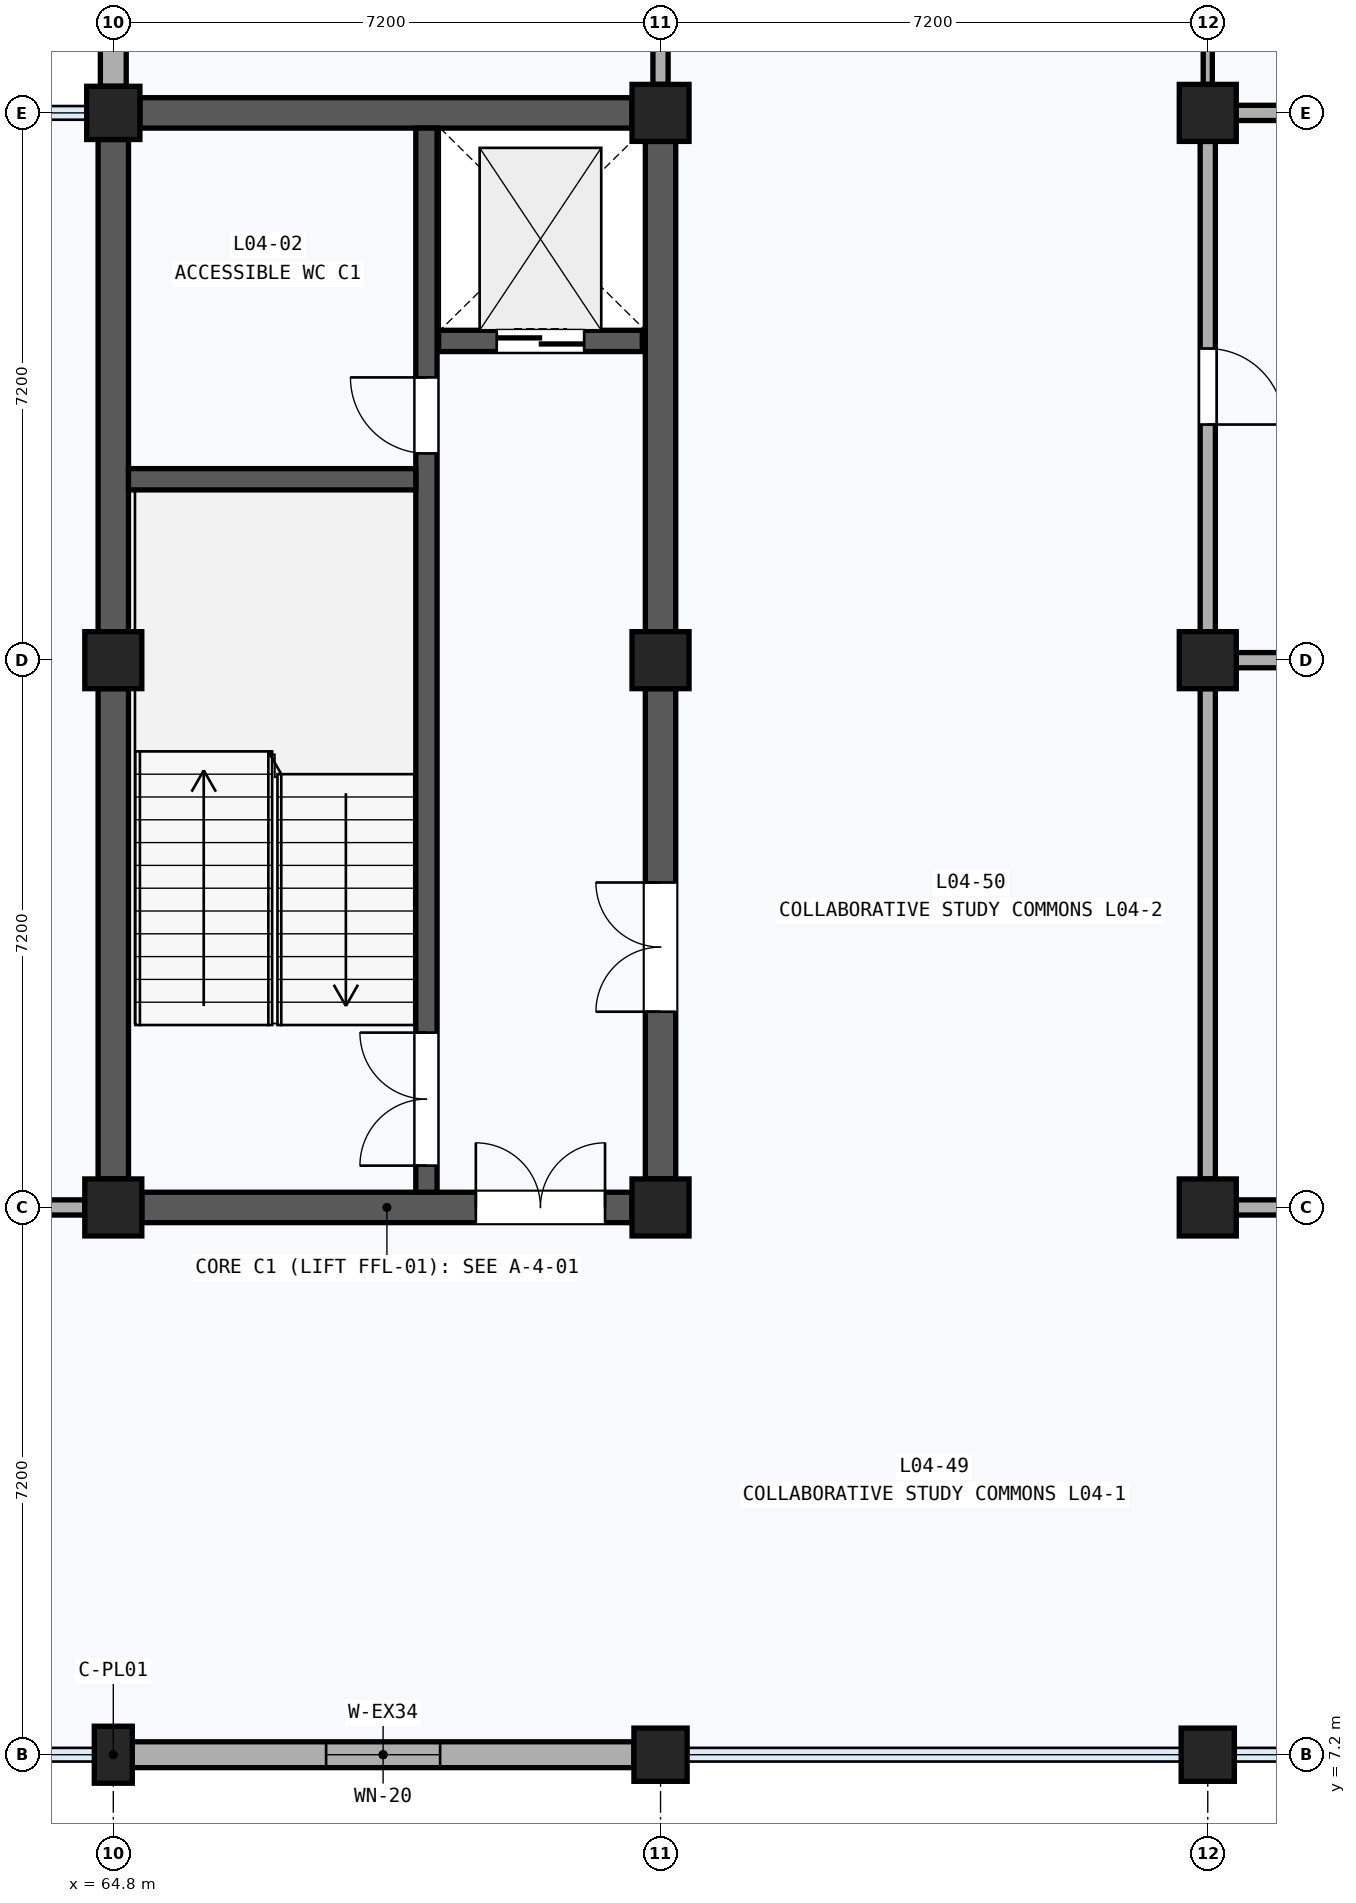
"""IFC4 building model, lengths in metres.
Left out: names, types, materials, properties, quantities, classifications, styles, units other than length and angle.
Written with IfcOpenShell. Run it as: python <this file> out.ifc"""

import sys

from ifc_helpers import new_model, si_unit, direction, frame, frame_2d, origin, origin_2d, place, context, subcontext, project, spatial, rectangle, extrude, element, fill, save


model = new_model("IFC4")
c1 = context("Model", 3, precision=1e-05, world=origin(), true_north=direction((0.0, 1.0)))
c2 = subcontext(c1, "Body", "Model", "MODEL_VIEW")
j1 = project(units=[si_unit("LENGTHUNIT", "METRE"), si_unit("PLANEANGLEUNIT", "RADIAN")], contexts=[c1])
p1 = place(None, origin())
s1 = spatial("IfcSite", under=j1, at=p1, CompositionType="ELEMENT")
p2 = place(p1, origin())
s2 = spatial("IfcBuilding", under=s1, at=p2, CompositionType="ELEMENT")
p3 = place(p2, frame((0.0, 0.0, 18.6)))
s3 = spatial("IfcBuildingStorey", under=s2, at=p3, CompositionType="ELEMENT", Elevation=18.6)
p4 = place(p3, frame((64.8, 7.2, 0.0), z_axis=(0.0, 0.0, 1.0), x_axis=(1.0, 0.0, 0.0)))
e1 = element("IfcColumn", 1, at=p4, inside=s3, PredefinedType="PILASTER", context=c2, shape_type="SweptSolid", body=[
    extrude(rectangle(XDim=0.5, YDim=0.75, at=origin_2d()), origin(), (0.0, 0.0, 1.0), 4.0),
])
for number, where, z_axis, x_axis in (
    (2, (64.8, 14.4, 0.0), (0.0, 0.0, 1.0), (1.0, 0.0, 0.0)),
    (3, (64.8, 21.6, 0.0), (0.0, 0.0, 1.0), (1.0, 0.0, 0.0)),
):
    element("IfcColumn", number, at=place(p3, frame(where, z_axis=z_axis, x_axis=x_axis)), inside=s3, PredefinedType="COLUMN", context=c2, shape_type="SweptSolid", body=[
        extrude(rectangle(XDim=0.75, YDim=0.75, at=origin_2d()), origin(), (0.0, 0.0, 1.0), 4.0),
    ])
for number, where, z_axis, x_axis in (
    (4, (64.8, 28.8, 0.0), (0.0, 0.0, 1.0), (1.0, 0.0, 0.0)),
    (5, (72.0, 7.2, 0.0), (0.0, 0.0, 1.0), (1.0, 0.0, 0.0)),
):
    element("IfcColumn", number, at=place(p3, frame(where, z_axis=z_axis, x_axis=x_axis)), inside=s3, PredefinedType="COLUMN", context=c2, shape_type="SweptSolid", body=[
        extrude(rectangle(XDim=0.7, YDim=0.7, at=origin_2d()), origin(), (0.0, 0.0, 1.0), 4.0),
    ])
for number, where, z_axis, x_axis in (
    (6, (72.0, 14.4, 0.0), (0.0, 0.0, 1.0), (1.0, 0.0, 0.0)),
    (7, (72.0, 21.6, 0.0), (0.0, 0.0, 1.0), (1.0, 0.0, 0.0)),
    (8, (72.0, 28.8, 0.0), (0.0, 0.0, 1.0), (1.0, 0.0, 0.0)),
):
    element("IfcColumn", number, at=place(p3, frame(where, z_axis=z_axis, x_axis=x_axis)), inside=s3, PredefinedType="COLUMN", context=c2, shape_type="SweptSolid", body=[
        extrude(rectangle(XDim=0.75, YDim=0.75, at=origin_2d()), origin(), (0.0, 0.0, 1.0), 4.0),
    ])
p5 = place(p3, frame((79.2, 7.2, 0.0), z_axis=(0.0, 0.0, 1.0), x_axis=(1.0, 0.0, 0.0)))
e9 = element("IfcColumn", 9, at=p5, inside=s3, PredefinedType="COLUMN", context=c2, shape_type="SweptSolid", body=[
    extrude(rectangle(XDim=0.7, YDim=0.7, at=origin_2d()), origin(), (0.0, 0.0, 1.0), 4.0),
])
for number, where, z_axis, x_axis in (
    (10, (79.2, 14.4, 0.0), (0.0, 0.0, 1.0), (1.0, 0.0, 0.0)),
    (11, (79.2, 21.6, 0.0), (0.0, 0.0, 1.0), (1.0, 0.0, 0.0)),
    (12, (79.2, 28.8, 0.0), (0.0, 0.0, 1.0), (1.0, 0.0, 0.0)),
):
    element("IfcColumn", number, at=place(p3, frame(where, z_axis=z_axis, x_axis=x_axis)), inside=s3, PredefinedType="COLUMN", context=c2, shape_type="SweptSolid", body=[
        extrude(rectangle(XDim=0.75, YDim=0.75, at=origin_2d()), origin(), (0.0, 0.0, 1.0), 4.0),
    ])
p6 = place(p3, frame((65.05, 7.2, 0.0), z_axis=(0.0, 0.0, 1.0), x_axis=(1.0, 0.0, 0.0)))
e13 = element("IfcWall", 13, at=p6, inside=s3, PredefinedType="SOLIDWALL", context=c2, shape_type="SweptSolid", body=[
    extrude(rectangle(XDim=6.6, YDim=0.34, at=frame_2d((3.3, 0.0))), origin(), (0.0, 0.0, 1.0), 3.11),
])
p7 = place(p6, frame((2.55, 0.0, 1.1)))
e14 = element("IfcOpeningElement", 14, at=p7, cuts=e13, PredefinedType="OPENING", context=c2, shape_type="SweptSolid", body=[
    extrude(rectangle(XDim=1.5, YDim=1.35, at=frame_2d((0.75, 0.675))), frame((0.0, 0.182, 0.0), z_axis=(0.0, -1.0, 0.0), x_axis=(1.0, 0.0, 0.0)), (0.0, 0.0, 1.0), 0.364),
])
p8 = place(p3, frame((64.8, 29.15, 0.0), z_axis=(0.0, 0.0, 1.0), x_axis=(0.0, 1.0, 0.0)))
e15 = element("IfcWall", 15, at=p8, inside=s3, PredefinedType="SOLIDWALL", context=c2, shape_type="SweptSolid", body=[
    extrude(rectangle(XDim=6.5, YDim=0.34, at=frame_2d((3.25, 0.0))), origin(), (0.0, 0.0, 1.0), 3.11),
])
p9 = place(p8, frame((2.15, 0.0, 0.9)))
e16 = element("IfcOpeningElement", 16, at=p9, cuts=e15, PredefinedType="OPENING", context=c2, shape_type="SweptSolid", body=[
    extrude(rectangle(XDim=2.2, YDim=1.8, at=frame_2d((1.1, 0.9))), frame((0.0, 0.182, 0.0), z_axis=(0.0, -1.0, 0.0), x_axis=(1.0, 0.0, 0.0)), (0.0, 0.0, 1.0), 0.364),
])
p10 = place(p3, frame((64.8, 14.775, 0.0), z_axis=(0.0, 0.0, 1.0), x_axis=(0.0, 1.0, 0.0)))
e17 = element("IfcWall", 17, at=p10, inside=s3, PredefinedType="SHEAR", context=c2, shape_type="SweptSolid", body=[
    extrude(rectangle(XDim=6.45, YDim=0.4, at=frame_2d((3.225, 0.0))), origin(), (0.0, 0.0, 1.0), 2.97),
])
p11 = place(p3, frame((64.8, 21.975, 0.0), z_axis=(0.0, 0.0, 1.0), x_axis=(0.0, 1.0, 0.0)))
e18 = element("IfcWall", 18, at=p11, inside=s3, PredefinedType="SHEAR", context=c2, shape_type="SweptSolid", body=[
    extrude(rectangle(XDim=6.475, YDim=0.4, at=frame_2d((3.237, 0.0))), origin(), (0.0, 0.0, 1.0), 2.97),
])
p12 = place(p3, frame((72.0, 14.775, 0.0), z_axis=(0.0, 0.0, 1.0), x_axis=(0.0, 1.0, 0.0)))
e19 = element("IfcWall", 19, at=p12, inside=s3, PredefinedType="SHEAR", context=c2, shape_type="SweptSolid", body=[
    extrude(rectangle(XDim=6.45, YDim=0.4, at=frame_2d((3.225, 0.0))), origin(), (0.0, 0.0, 1.0), 2.97),
])
p13 = place(p12, frame((2.2, 0.0, 0.0)))
e20 = element("IfcOpeningElement", 20, at=p13, cuts=e19, PredefinedType="OPENING", context=c2, shape_type="SweptSolid", body=[
    extrude(rectangle(XDim=1.7, YDim=2.25, at=frame_2d((0.85, 1.125))), frame((0.0, 0.212, 0.0), z_axis=(0.0, -1.0, 0.0), x_axis=(1.0, 0.0, 0.0)), (0.0, 0.0, 1.0), 0.424),
])
p14 = place(p3, frame((72.0, 21.975, 0.0), z_axis=(0.0, 0.0, 1.0), x_axis=(0.0, 1.0, 0.0)))
e21 = element("IfcWall", 21, at=p14, inside=s3, PredefinedType="SHEAR", context=c2, shape_type="SweptSolid", body=[
    extrude(rectangle(XDim=6.45, YDim=0.4, at=frame_2d((3.225, 0.0))), origin(), (0.0, 0.0, 1.0), 2.97),
])
p15 = place(p3, frame((65.175, 14.4, 0.0), z_axis=(0.0, 0.0, 1.0), x_axis=(1.0, 0.0, 0.0)))
e22 = element("IfcWall", 22, at=p15, inside=s3, PredefinedType="SHEAR", context=c2, shape_type="SweptSolid", body=[
    extrude(rectangle(XDim=6.45, YDim=0.4, at=frame_2d((3.225, 0.0))), origin(), (0.0, 0.0, 1.0), 2.97),
])
p16 = place(p15, frame((4.395, 0.0, 0.0)))
e23 = element("IfcOpeningElement", 23, at=p16, cuts=e22, PredefinedType="OPENING", context=c2, shape_type="SweptSolid", body=[
    extrude(rectangle(XDim=1.7, YDim=2.25, at=frame_2d((0.85, 1.125))), frame((0.0, 0.212, 0.0), z_axis=(0.0, -1.0, 0.0), x_axis=(1.0, 0.0, 0.0)), (0.0, 0.0, 1.0), 0.424),
])
p17 = place(p3, frame((65.15, 28.8, 0.0), z_axis=(0.0, 0.0, 1.0), x_axis=(1.0, 0.0, 0.0)))
e24 = element("IfcWall", 24, at=p17, inside=s3, PredefinedType="SHEAR", context=c2, shape_type="SweptSolid", body=[
    extrude(rectangle(XDim=6.475, YDim=0.4, at=frame_2d((3.238, 0.0))), origin(), (0.0, 0.0, 1.0), 2.97),
])
p18 = place(p3, frame((68.92, 14.6, 0.0), z_axis=(0.0, 0.0, 1.0), x_axis=(0.0, 1.0, 0.0)))
e25 = element("IfcWall", 25, at=p18, inside=s3, PredefinedType="SHEAR", context=c2, shape_type="SweptSolid", body=[
    extrude(rectangle(XDim=14.0, YDim=0.28, at=frame_2d((7.0, 0.0))), origin(), (0.0, 0.0, 1.0), 3.74),
])
p19 = place(p18, frame((0.35, 0.0, 0.0)))
e26 = element("IfcOpeningElement", 26, at=p19, cuts=e25, PredefinedType="OPENING", context=c2, shape_type="SweptSolid", body=[
    extrude(rectangle(XDim=1.75, YDim=2.15, at=frame_2d((0.875, 1.075))), frame((0.0, 0.152, 0.0), z_axis=(0.0, -1.0, 0.0), x_axis=(1.0, 0.0, 0.0)), (0.0, 0.0, 1.0), 0.304),
])
p20 = place(p18, frame((9.72, 0.0, 0.0)))
e27 = element("IfcOpeningElement", 27, at=p20, cuts=e25, PredefinedType="OPENING", context=c2, shape_type="SweptSolid", body=[
    extrude(rectangle(XDim=1.0, YDim=2.15, at=frame_2d((0.5, 1.075))), frame((0.0, 0.152, 0.0), z_axis=(0.0, -1.0, 0.0), x_axis=(1.0, 0.0, 0.0)), (0.0, 0.0, 1.0), 0.304),
])
p21 = place(p3, frame((65.0, 23.98, 0.0), z_axis=(0.0, 0.0, 1.0), x_axis=(1.0, 0.0, 0.0)))
e28 = element("IfcWall", 28, at=p21, inside=s3, PredefinedType="SHEAR", context=c2, shape_type="SweptSolid", body=[
    extrude(rectangle(XDim=3.78, YDim=0.28, at=frame_2d((1.89, 0.0))), origin(), (0.0, 0.0, 1.0), 3.74),
])
p22 = place(p3, frame((69.08, 25.8, 0.0), z_axis=(0.0, 0.0, 1.0), x_axis=(1.0, 0.0, 0.0)))
e29 = element("IfcWall", 29, at=p22, inside=s3, PredefinedType="SHEAR", context=c2, shape_type="SweptSolid", body=[
    extrude(rectangle(XDim=2.68, YDim=0.28, at=frame_2d((1.34, 0.0))), origin(), (0.0, 0.0, 1.0), 3.74),
])
p23 = place(p22, frame((0.765, 0.0, 0.0)))
e30 = element("IfcOpeningElement", 30, at=p23, cuts=e29, PredefinedType="OPENING", context=c2, shape_type="SweptSolid", body=[
    extrude(rectangle(XDim=1.15, YDim=2.2, at=frame_2d((0.575, 1.1))), frame((0.0, 0.152, 0.0), z_axis=(0.0, -1.0, 0.0), x_axis=(1.0, 0.0, 0.0)), (0.0, 0.0, 1.0), 0.304),
])
p24 = place(p3, frame((57.975, 14.4, 0.0), z_axis=(0.0, 0.0, 1.0), x_axis=(1.0, 0.0, 0.0)))
e31 = element("IfcWall", 31, at=p24, inside=s3, PredefinedType="PARTITIONING", context=c2, shape_type="SweptSolid", body=[
    extrude(rectangle(XDim=6.45, YDim=0.2, at=frame_2d((3.225, 0.0))), origin(), (0.0, 0.0, 1.0), 2.97),
])
p25 = place(p24, frame((2.725, 0.0, 0.0)))
e32 = element("IfcOpeningElement", 32, at=p25, cuts=e31, PredefinedType="OPENING", context=c2, shape_type="SweptSolid", body=[
    extrude(rectangle(XDim=1.0, YDim=2.1, at=frame_2d((0.5, 1.05))), frame((0.0, 0.112, 0.0), z_axis=(0.0, -1.0, 0.0), x_axis=(1.0, 0.0, 0.0)), (0.0, 0.0, 1.0), 0.224),
])
p26 = place(p3, frame((72.0, 29.175, 0.0), z_axis=(0.0, 0.0, 1.0), x_axis=(0.0, 1.0, 0.0)))
e33 = element("IfcWall", 33, at=p26, inside=s3, PredefinedType="PARTITIONING", context=c2, shape_type="SweptSolid", body=[
    extrude(rectangle(XDim=6.45, YDim=0.2, at=frame_2d((3.225, 0.0))), origin(), (0.0, 0.0, 1.0), 2.97),
])
p27 = place(p26, frame((2.625, 0.0, 0.0)))
e34 = element("IfcOpeningElement", 34, at=p27, cuts=e33, PredefinedType="OPENING", context=c2, shape_type="SweptSolid", body=[
    extrude(rectangle(XDim=1.2, YDim=2.24, at=frame_2d((0.6, 1.12))), frame((0.0, 0.112, 0.0), z_axis=(0.0, -1.0, 0.0), x_axis=(1.0, 0.0, 0.0)), (0.0, 0.0, 1.0), 0.224),
])
p28 = place(p3, frame((79.575, 14.4, 0.0), z_axis=(0.0, 0.0, 1.0), x_axis=(1.0, 0.0, 0.0)))
e35 = element("IfcWall", 35, at=p28, inside=s3, PredefinedType="PARTITIONING", context=c2, shape_type="SweptSolid", body=[
    extrude(rectangle(XDim=6.45, YDim=0.2, at=frame_2d((3.225, 0.0))), origin(), (0.0, 0.0, 1.0), 2.97),
])
p29 = place(p28, frame((2.585, 0.0, 0.0)))
e36 = element("IfcOpeningElement", 36, at=p29, cuts=e35, PredefinedType="OPENING", context=c2, shape_type="SweptSolid", body=[
    extrude(rectangle(XDim=1.28, YDim=2.28, at=frame_2d((0.64, 1.14))), frame((0.0, 0.112, 0.0), z_axis=(0.0, -1.0, 0.0), x_axis=(1.0, 0.0, 0.0)), (0.0, 0.0, 1.0), 0.224),
])
p30 = place(p3, frame((79.575, 21.6, 0.0), z_axis=(0.0, 0.0, 1.0), x_axis=(1.0, 0.0, 0.0)))
e37 = element("IfcWall", 37, at=p30, inside=s3, PredefinedType="PARTITIONING", context=c2, shape_type="SweptSolid", body=[
    extrude(rectangle(XDim=6.45, YDim=0.2, at=frame_2d((3.225, 0.0))), origin(), (0.0, 0.0, 1.0), 2.97),
])
p31 = place(p3, frame((79.2, 14.775, 0.0), z_axis=(0.0, 0.0, 1.0), x_axis=(0.0, 1.0, 0.0)))
e38 = element("IfcWall", 38, at=p31, inside=s3, PredefinedType="PARTITIONING", context=c2, shape_type="SweptSolid", body=[
    extrude(rectangle(XDim=6.45, YDim=0.2, at=frame_2d((3.225, 0.0))), origin(), (0.0, 0.0, 1.0), 2.97),
])
p32 = place(p3, frame((79.575, 28.8, 0.0), z_axis=(0.0, 0.0, 1.0), x_axis=(1.0, 0.0, 0.0)))
e39 = element("IfcWall", 39, at=p32, inside=s3, PredefinedType="PARTITIONING", context=c2, shape_type="SweptSolid", body=[
    extrude(rectangle(XDim=6.45, YDim=0.2, at=frame_2d((3.225, 0.0))), origin(), (0.0, 0.0, 1.0), 2.97),
])
p33 = place(p3, frame((79.2, 21.975, 0.0), z_axis=(0.0, 0.0, 1.0), x_axis=(0.0, 1.0, 0.0)))
e40 = element("IfcWall", 40, at=p33, inside=s3, PredefinedType="PARTITIONING", context=c2, shape_type="SweptSolid", body=[
    extrude(rectangle(XDim=6.45, YDim=0.2, at=frame_2d((3.225, 0.0))), origin(), (0.0, 0.0, 1.0), 2.97),
])
p34 = place(p33, frame((2.725, 0.0, 0.0)))
e41 = element("IfcOpeningElement", 41, at=p34, cuts=e40, PredefinedType="OPENING", context=c2, shape_type="SweptSolid", body=[
    extrude(rectangle(XDim=1.0, YDim=2.1, at=frame_2d((0.5, 1.05))), frame((0.0, 0.112, 0.0), z_axis=(0.0, -1.0, 0.0), x_axis=(1.0, 0.0, 0.0)), (0.0, 0.0, 1.0), 0.224),
])
p35 = place(p3, frame((79.2, 29.175, 0.0), z_axis=(0.0, 0.0, 1.0), x_axis=(0.0, 1.0, 0.0)))
e42 = element("IfcWall", 42, at=p35, inside=s3, PredefinedType="MOVABLE", context=c2, shape_type="SweptSolid", body=[
    extrude(rectangle(XDim=6.45, YDim=0.12, at=frame_2d((3.225, 0.0))), origin(), (0.0, 0.0, 1.0), 2.97),
])
p36 = place(p35, frame((2.715, 0.0, 0.0)))
e43 = element("IfcOpeningElement", 43, at=p36, cuts=e42, PredefinedType="OPENING", context=c2, shape_type="SweptSolid", body=[
    extrude(rectangle(XDim=1.02, YDim=2.12, at=frame_2d((0.51, 1.06))), frame((0.0, 0.072, 0.0), z_axis=(0.0, -1.0, 0.0), x_axis=(1.0, 0.0, 0.0)), (0.0, 0.0, 1.0), 0.144),
])
p37 = place(p7, origin())
e44 = element("IfcWindow", 44, at=p37, inside=s3, PartitioningType="SINGLE_PANEL", PredefinedType="WINDOW", context=c2, shape_type="SweptSolid", body=[
    extrude(rectangle(XDim=1.5, YDim=1.35, at=frame_2d((0.75, 0.675))), frame((0.0, 0.03, 0.0), z_axis=(0.0, -1.0, 0.0), x_axis=(1.0, 0.0, 0.0)), (0.0, 0.0, 1.0), 0.06),
])
fill(e14, e44)
p38 = place(p13, origin())
e45 = element("IfcDoor", 45, at=p38, inside=s3, OperationType="DOUBLE_DOOR_SINGLE_SWING", PredefinedType="DOOR", context=c2, shape_type="SweptSolid", body=[
    extrude(rectangle(XDim=1.7, YDim=2.25, at=frame_2d((0.85, 1.125))), frame((0.0, 0.025, 0.0), z_axis=(0.0, -1.0, 0.0), x_axis=(1.0, 0.0, 0.0)), (0.0, 0.0, 1.0), 0.05),
])
fill(e20, e45)
p39 = place(p16, origin())
e46 = element("IfcDoor", 46, at=p39, inside=s3, OperationType="DOUBLE_DOOR_SINGLE_SWING", PredefinedType="DOOR", context=c2, shape_type="SweptSolid", body=[
    extrude(rectangle(XDim=1.7, YDim=2.25, at=frame_2d((0.85, 1.125))), frame((0.0, 0.025, 0.0), z_axis=(0.0, -1.0, 0.0), x_axis=(1.0, 0.0, 0.0)), (0.0, 0.0, 1.0), 0.05),
])
fill(e23, e46)
p40 = place(p19, origin())
e47 = element("IfcDoor", 47, at=p40, inside=s3, OperationType="DOUBLE_DOOR_SINGLE_SWING", PredefinedType="DOOR", context=c2, shape_type="SweptSolid", body=[
    extrude(rectangle(XDim=1.75, YDim=2.15, at=frame_2d((0.875, 1.075))), frame((0.0, 0.025, 0.0), z_axis=(0.0, -1.0, 0.0), x_axis=(1.0, 0.0, 0.0)), (0.0, 0.0, 1.0), 0.05),
])
fill(e26, e47)
p41 = place(p20, origin())
e48 = element("IfcDoor", 48, at=p41, inside=s3, OperationType="SINGLE_SWING_RIGHT", PredefinedType="DOOR", context=c2, shape_type="SweptSolid", body=[
    extrude(rectangle(XDim=1.0, YDim=2.15, at=frame_2d((0.5, 1.075))), frame((0.0, 0.025, 0.0), z_axis=(0.0, -1.0, 0.0), x_axis=(1.0, 0.0, 0.0)), (0.0, 0.0, 1.0), 0.05),
])
fill(e27, e48)
p42 = place(p23, frame((1.15, 0.0, 0.0), z_axis=(0.0, 0.0, 1.0), x_axis=(-1.0, 0.0, 0.0)))
e49 = element("IfcDoor", 49, at=p42, inside=s3, OperationType="DOUBLE_DOOR_SLIDING", PredefinedType="DOOR", context=c2, shape_type="SweptSolid", body=[
    extrude(rectangle(XDim=1.15, YDim=2.2, at=frame_2d((0.575, 1.1))), frame((0.0, 0.025, 0.0), z_axis=(0.0, -1.0, 0.0), x_axis=(1.0, 0.0, 0.0)), (0.0, 0.0, 1.0), 0.05),
])
fill(e30, e49)
p43 = place(p34, frame((1.0, 0.0, 0.0), z_axis=(0.0, 0.0, 1.0), x_axis=(-1.0, 0.0, 0.0)))
e50 = element("IfcDoor", 50, at=p43, inside=s3, OperationType="SINGLE_SWING_RIGHT", PredefinedType="DOOR", context=c2, shape_type="SweptSolid", body=[
    extrude(rectangle(XDim=1.0, YDim=2.1, at=frame_2d((0.5, 1.05))), frame((0.0, 0.025, 0.0), z_axis=(0.0, -1.0, 0.0), x_axis=(1.0, 0.0, 0.0)), (0.0, 0.0, 1.0), 0.05),
])
fill(e41, e50)
save(model, sys.argv[1])
